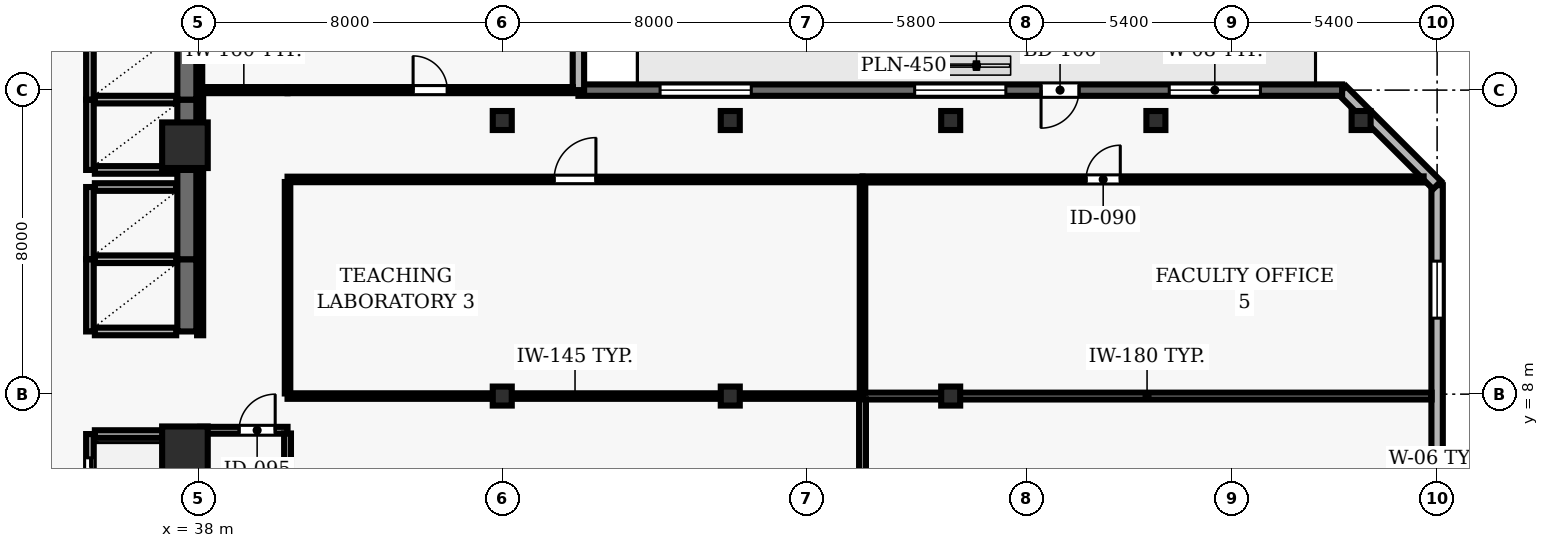
"""IFC4 building model, lengths in metres.
Left out: names, types, materials, properties, quantities, classifications, styles, units other than length and angle.
Written with IfcOpenShell. Run it as: python <this file> out.ifc"""

import sys

from ifc_helpers import new_model, si_unit, direction, frame, frame_2d, origin, origin_2d, place, context, subcontext, project, spatial, rectangle, hollow_rectangle, extrude, element, fill, save


model = new_model("IFC4")
c1 = context("Model", 3, precision=1e-05, world=origin(), true_north=direction((0.0, 1.0)))
c2 = subcontext(c1, "Body", "Model", "MODEL_VIEW")
j1 = project(units=[si_unit("LENGTHUNIT", "METRE"), si_unit("PLANEANGLEUNIT", "RADIAN")], contexts=[c1])
p1 = place(None, origin())
s1 = spatial("IfcSite", under=j1, at=p1, CompositionType="ELEMENT")
p2 = place(p1, origin())
s2 = spatial("IfcBuilding", under=s1, at=p2, CompositionType="ELEMENT")
p3 = place(p2, frame((0.0, 0.0, 115.1)))
s3 = spatial("IfcBuildingStorey", under=s2, at=p3, CompositionType="ELEMENT", Elevation=115.1)
for number, where, z_axis, x_axis in (
    (1, (37.65, 6.55, 0.0), (0.0, 0.0, 1.0), (1.0, 0.0, 0.0)),
    (2, (37.65, 14.55, 0.0), (0.0, 0.0, 1.0), (1.0, 0.0, 0.0)),
):
    element("IfcColumn", number, at=place(p3, frame(where, z_axis=z_axis, x_axis=x_axis)), inside=s3, PredefinedType="COLUMN", context=c2, shape_type="SweptSolid", body=[
        extrude(rectangle(XDim=1.2, YDim=1.2, at=origin_2d()), origin(), (0.0, 0.0, 1.0), 3.9),
    ])
for number, where, z_axis, x_axis in (
    (3, (46.0, 7.95, 0.0), (0.0, 0.0, 1.0), (1.0, 0.0, 0.0)),
    (4, (46.0, 15.2, 0.0), (0.0, 0.0, 1.0), (1.0, 0.0, 0.0)),
    (5, (52.0, 7.95, 0.0), (0.0, 0.0, 1.0), (1.0, 0.0, 0.0)),
    (6, (52.0, 15.2, 0.0), (0.0, 0.0, 1.0), (1.0, 0.0, 0.0)),
    (7, (57.8, 7.95, 0.0), (0.0, 0.0, 1.0), (1.0, 0.0, 0.0)),
    (8, (57.8, 15.2, 0.0), (0.0, 0.0, 1.0), (1.0, 0.0, 0.0)),
    (9, (63.2, 15.2, 0.0), (0.0, 0.0, 1.0), (1.0, 0.0, 0.0)),
    (10, (68.6, 15.2, 0.0), (0.0, 0.0, 1.0), (1.0, 0.0, 0.0)),
):
    element("IfcColumn", number, at=place(p3, frame(where, z_axis=z_axis, x_axis=x_axis)), inside=s3, PredefinedType="COLUMN", context=c2, shape_type="SweptSolid", body=[
        extrude(hollow_rectangle(XDim=0.5, YDim=0.5, WallThickness=0.025, at=origin_2d()), origin(), (0.0, 0.0, 1.0), 3.9),
    ])
p4 = place(p3, frame((70.6, 2.5, 0.0), z_axis=(0.0, 0.0, 1.0), x_axis=(0.0, 1.0, 0.0)))
e11 = element("IfcWall", 11, at=p4, inside=s3, PredefinedType="SOLIDWALL", context=c2, shape_type="SweptSolid", body=[
    extrude(rectangle(XDim=11.0, YDim=0.3, at=frame_2d((5.5, 0.0))), origin(), (0.0, 0.0, 1.0), 3.69),
])
p5 = place(p4, frame((2.0, 0.0, 0.9)))
e12 = element("IfcOpeningElement", 12, at=p5, cuts=e11, PredefinedType="OPENING", context=c2, shape_type="SweptSolid", body=[
    extrude(rectangle(XDim=1.5, YDim=1.8, at=frame_2d((0.75, 0.9))), frame((0.0, 0.16, 0.0), z_axis=(0.0, -1.0, 0.0), x_axis=(1.0, 0.0, 0.0)), (0.0, 0.0, 1.0), 0.32),
])
p6 = place(p4, frame((7.5, 0.0, 0.9)))
e13 = element("IfcOpeningElement", 13, at=p6, cuts=e11, PredefinedType="OPENING", context=c2, shape_type="SweptSolid", body=[
    extrude(rectangle(XDim=1.5, YDim=1.8, at=frame_2d((0.75, 0.9))), frame((0.0, 0.16, 0.0), z_axis=(0.0, -1.0, 0.0), x_axis=(1.0, 0.0, 0.0)), (0.0, 0.0, 1.0), 0.32),
])
p7 = place(p3, frame((70.6, 13.5, 0.0), z_axis=(0.0, 0.0, 1.0), x_axis=(-0.707106781187, 0.707106781187, 0.0)))
e14 = element("IfcWall", 14, at=p7, inside=s3, PredefinedType="SOLIDWALL", context=c2, shape_type="SweptSolid", body=[
    extrude(rectangle(XDim=3.536, YDim=0.3, at=frame_2d((1.768, 0.0))), origin(), (0.0, 0.0, 1.0), 3.69),
])
p8 = place(p3, frame((68.1, 16.0, 0.0), z_axis=(0.0, 0.0, 1.0), x_axis=(-1.0, 0.0, 0.0)))
e15 = element("IfcWall", 15, at=p8, inside=s3, PredefinedType="SOLIDWALL", context=c2, shape_type="SweptSolid", body=[
    extrude(rectangle(XDim=20.096, YDim=0.3, at=frame_2d((10.048, 0.0))), origin(), (0.0, 0.0, 1.0), 3.69),
])
p9 = place(p8, frame((6.922, 0.0, 0.0)))
e16 = element("IfcOpeningElement", 16, at=p9, cuts=e15, PredefinedType="OPENING", context=c2, shape_type="SweptSolid", body=[
    extrude(rectangle(XDim=1.0, YDim=2.2, at=frame_2d((0.5, 1.1))), frame((0.0, 0.16, 0.0), z_axis=(0.0, -1.0, 0.0), x_axis=(1.0, 0.0, 0.0)), (0.0, 0.0, 1.0), 0.32),
])
p10 = place(p8, frame((2.149, 0.0, 0.9)))
e17 = element("IfcOpeningElement", 17, at=p10, cuts=e15, PredefinedType="OPENING", context=c2, shape_type="SweptSolid", body=[
    extrude(rectangle(XDim=2.4, YDim=1.8, at=frame_2d((1.2, 0.9))), frame((0.0, 0.16, 0.0), z_axis=(0.0, -1.0, 0.0), x_axis=(1.0, 0.0, 0.0)), (0.0, 0.0, 1.0), 0.32),
])
p11 = place(p8, frame((8.848, 0.0, 0.9)))
e18 = element("IfcOpeningElement", 18, at=p11, cuts=e15, PredefinedType="OPENING", context=c2, shape_type="SweptSolid", body=[
    extrude(rectangle(XDim=2.4, YDim=1.8, at=frame_2d((1.2, 0.9))), frame((0.0, 0.16, 0.0), z_axis=(0.0, -1.0, 0.0), x_axis=(1.0, 0.0, 0.0)), (0.0, 0.0, 1.0), 0.32),
])
p12 = place(p8, frame((15.547, 0.0, 0.9)))
e19 = element("IfcOpeningElement", 19, at=p12, cuts=e15, PredefinedType="OPENING", context=c2, shape_type="SweptSolid", body=[
    extrude(rectangle(XDim=2.4, YDim=1.8, at=frame_2d((1.2, 0.9))), frame((0.0, 0.16, 0.0), z_axis=(0.0, -1.0, 0.0), x_axis=(1.0, 0.0, 0.0)), (0.0, 0.0, 1.0), 0.32),
])
p13 = place(p3, frame((48.004, 16.0, 0.0), z_axis=(0.0, 0.0, 1.0), x_axis=(0.0, 1.0, 0.0)))
e20 = element("IfcWall", 20, at=p13, inside=s3, PredefinedType="SOLIDWALL", context=c2, shape_type="SweptSolid", body=[
    extrude(rectangle(XDim=12.15, YDim=0.3, at=frame_2d((6.075, 0.0))), origin(), (0.0, 0.0, 1.0), 3.69),
])
p14 = place(p13, frame((1.637, 0.0, 0.9)))
e21 = element("IfcOpeningElement", 21, at=p14, cuts=e20, PredefinedType="OPENING", context=c2, shape_type="SweptSolid", body=[
    extrude(rectangle(XDim=2.8, YDim=1.8, at=frame_2d((1.4, 0.9))), frame((0.0, 0.16, 0.0), z_axis=(0.0, -1.0, 0.0), x_axis=(1.0, 0.0, 0.0)), (0.0, 0.0, 1.0), 0.32),
])
p15 = place(p13, frame((7.712, 0.0, 0.9)))
e22 = element("IfcOpeningElement", 22, at=p15, cuts=e20, PredefinedType="OPENING", context=c2, shape_type="SweptSolid", body=[
    extrude(rectangle(XDim=2.8, YDim=1.8, at=frame_2d((1.4, 0.9))), frame((0.0, 0.16, 0.0), z_axis=(0.0, -1.0, 0.0), x_axis=(1.0, 0.0, 0.0)), (0.0, 0.0, 1.0), 0.32),
])
p16 = place(p3, frame((35.15, 6.95, 0.0), z_axis=(0.0, 0.0, 1.0), x_axis=(0.0, -1.0, 0.0)))
e23 = element("IfcWall", 23, at=p16, inside=s3, PredefinedType="SOLIDWALL", context=c2, shape_type="SweptSolid", body=[
    extrude(rectangle(XDim=2.25, YDim=0.2, at=frame_2d((1.125, 0.0))), origin(), (0.0, 0.0, 1.0), 3.69),
])
p17 = place(p16, frame((0.625, 0.0, 0.0)))
e24 = element("IfcOpeningElement", 24, at=p17, cuts=e23, PredefinedType="OPENING", context=c2, shape_type="SweptSolid", body=[
    extrude(rectangle(XDim=1.0, YDim=2.1, at=frame_2d((0.5, 1.05))), frame((0.0, 0.11, 0.0), z_axis=(0.0, -1.0, 0.0), x_axis=(1.0, 0.0, 0.0)), (0.0, 0.0, 1.0), 0.22),
])
p18 = place(p3, frame((37.7, 4.7, 0.0), z_axis=(0.0, 0.0, 1.0), x_axis=(0.0, 1.0, 0.0)))
e25 = element("IfcWall", 25, at=p18, inside=s3, PredefinedType="SHEAR", context=c2, shape_type="SweptSolid", body=[
    extrude(rectangle(XDim=2.25, YDim=0.5, at=frame_2d((1.125, 0.0))), origin(), (0.0, 0.0, 1.0), 3.69),
])
p19 = place(p3, frame((37.42, 6.95, 0.0), z_axis=(0.0, 0.0, 1.0), x_axis=(-1.0, 0.0, 0.0)))
e26 = element("IfcWall", 26, at=p19, inside=s3, PredefinedType="SOLIDWALL", context=c2, shape_type="SweptSolid", body=[
    extrude(rectangle(XDim=2.14, YDim=0.2, at=frame_2d((1.07, 0.0))), origin(), (0.0, 0.0, 1.0), 3.69),
])
p20 = place(p3, frame((35.15, 11.55, 0.0), z_axis=(0.0, 0.0, 1.0), x_axis=(0.0, -1.0, 0.0)))
e27 = element("IfcWall", 27, at=p20, inside=s3, PredefinedType="SOLIDWALL", context=c2, shape_type="SweptSolid", body=[
    extrude(rectangle(XDim=1.9, YDim=0.2, at=frame_2d((0.95, 0.0))), origin(), (0.0, 0.0, 1.0), 3.69),
])
p21 = place(p3, frame((37.7, 9.65, 0.0), z_axis=(0.0, 0.0, 1.0), x_axis=(0.0, 1.0, 0.0)))
e28 = element("IfcWall", 28, at=p21, inside=s3, PredefinedType="SHEAR", context=c2, shape_type="SweptSolid", body=[
    extrude(rectangle(XDim=1.9, YDim=0.5, at=frame_2d((0.95, 0.0))), origin(), (0.0, 0.0, 1.0), 3.69),
])
for number, where, z_axis, x_axis in (
    (29, (35.28, 9.65, 0.0), (0.0, 0.0, 1.0), (1.0, 0.0, 0.0)),
    (30, (37.42, 11.55, 0.0), (0.0, 0.0, 1.0), (-1.0, 0.0, 0.0)),
):
    element("IfcWall", number, at=place(p3, frame(where, z_axis=z_axis, x_axis=x_axis)), inside=s3, PredefinedType="SOLIDWALL", context=c2, shape_type="SweptSolid", body=[
        extrude(rectangle(XDim=2.14, YDim=0.2, at=frame_2d((1.07, 0.0))), origin(), (0.0, 0.0, 1.0), 3.69),
    ])
p22 = place(p3, frame((35.15, 13.45, 0.0), z_axis=(0.0, 0.0, 1.0), x_axis=(0.0, -1.0, 0.0)))
e31 = element("IfcWall", 31, at=p22, inside=s3, PredefinedType="SOLIDWALL", context=c2, shape_type="SweptSolid", body=[
    extrude(rectangle(XDim=1.9, YDim=0.2, at=frame_2d((0.95, 0.0))), origin(), (0.0, 0.0, 1.0), 3.69),
])
p23 = place(p3, frame((37.7, 11.55, 0.0), z_axis=(0.0, 0.0, 1.0), x_axis=(0.0, 1.0, 0.0)))
e32 = element("IfcWall", 32, at=p23, inside=s3, PredefinedType="SHEAR", context=c2, shape_type="SweptSolid", body=[
    extrude(rectangle(XDim=2.35, YDim=0.5, at=frame_2d((1.175, 0.0))), origin(), (0.0, 0.0, 1.0), 3.69),
])
p24 = place(p3, frame((37.42, 13.45, 0.0), z_axis=(0.0, 0.0, 1.0), x_axis=(-1.0, 0.0, 0.0)))
e33 = element("IfcWall", 33, at=p24, inside=s3, PredefinedType="SOLIDWALL", context=c2, shape_type="SweptSolid", body=[
    extrude(rectangle(XDim=2.14, YDim=0.2, at=frame_2d((1.07, 0.0))), origin(), (0.0, 0.0, 1.0), 3.69),
])
p25 = place(p3, frame((35.15, 15.75, 0.0), z_axis=(0.0, 0.0, 1.0), x_axis=(0.0, -1.0, 0.0)))
e34 = element("IfcWall", 34, at=p25, inside=s3, PredefinedType="SOLIDWALL", context=c2, shape_type="SweptSolid", body=[
    extrude(rectangle(XDim=1.85, YDim=0.2, at=frame_2d((0.925, 0.0))), origin(), (0.0, 0.0, 1.0), 3.69),
])
p26 = place(p3, frame((37.7, 13.9, 0.0), z_axis=(0.0, 0.0, 1.0), x_axis=(0.0, 1.0, 0.0)))
e35 = element("IfcWall", 35, at=p26, inside=s3, PredefinedType="SHEAR", context=c2, shape_type="SweptSolid", body=[
    extrude(rectangle(XDim=1.85, YDim=0.5, at=frame_2d((0.925, 0.0))), origin(), (0.0, 0.0, 1.0), 3.69),
])
for number, where, z_axis, x_axis in (
    (36, (35.28, 13.9, 0.0), (0.0, 0.0, 1.0), (1.0, 0.0, 0.0)),
    (37, (37.42, 15.75, 0.0), (0.0, 0.0, 1.0), (-1.0, 0.0, 0.0)),
):
    element("IfcWall", number, at=place(p3, frame(where, z_axis=z_axis, x_axis=x_axis)), inside=s3, PredefinedType="SOLIDWALL", context=c2, shape_type="SweptSolid", body=[
        extrude(rectangle(XDim=2.14, YDim=0.2, at=frame_2d((1.07, 0.0))), origin(), (0.0, 0.0, 1.0), 3.69),
    ])
p27 = place(p3, frame((35.15, 17.6, 0.0), z_axis=(0.0, 0.0, 1.0), x_axis=(0.0, -1.0, 0.0)))
e38 = element("IfcWall", 38, at=p27, inside=s3, PredefinedType="SOLIDWALL", context=c2, shape_type="SweptSolid", body=[
    extrude(rectangle(XDim=1.85, YDim=0.2, at=frame_2d((0.925, 0.0))), origin(), (0.0, 0.0, 1.0), 3.69),
])
p28 = place(p3, frame((37.7, 15.75, 0.0), z_axis=(0.0, 0.0, 1.0), x_axis=(0.0, 1.0, 0.0)))
e39 = element("IfcWall", 39, at=p28, inside=s3, PredefinedType="SHEAR", context=c2, shape_type="SweptSolid", body=[
    extrude(rectangle(XDim=1.85, YDim=0.5, at=frame_2d((0.925, 0.0))), origin(), (0.0, 0.0, 1.0), 3.69),
])
p29 = place(p3, frame((38.05, 7.05, 0.0), z_axis=(0.0, 0.0, 1.0), x_axis=(1.0, 0.0, 0.0)))
e40 = element("IfcWall", 40, at=p29, inside=s3, PredefinedType="PARTITIONING", context=c2, shape_type="SweptSolid", body=[
    extrude(rectangle(XDim=2.3, YDim=0.18, at=frame_2d((1.15, 0.0))), origin(), (0.0, 0.0, 1.0), 3.69),
])
p30 = place(p29, frame((1.025, 0.0, 0.0)))
e41 = element("IfcOpeningElement", 41, at=p30, cuts=e40, PredefinedType="OPENING", context=c2, shape_type="SweptSolid", body=[
    extrude(rectangle(XDim=0.95, YDim=2.1, at=frame_2d((0.475, 1.05))), frame((0.0, 0.1, 0.0), z_axis=(0.0, -1.0, 0.0), x_axis=(1.0, 0.0, 0.0)), (0.0, 0.0, 1.0), 0.2),
])
p31 = place(p3, frame((40.35, 13.65, 0.0), z_axis=(0.0, 0.0, 1.0), x_axis=(1.0, 0.0, 0.0)))
e42 = element("IfcWall", 42, at=p31, inside=s3, PredefinedType="PARTITIONING", context=c2, shape_type="SweptSolid", body=[
    extrude(rectangle(XDim=15.13, YDim=0.145, at=frame_2d((7.565, 0.0))), origin(), (0.0, 0.0, 1.0), 3.69),
])
p32 = place(p31, frame((7.015, 0.0, 0.0)))
e43 = element("IfcOpeningElement", 43, at=p32, cuts=e42, PredefinedType="OPENING", context=c2, shape_type="SweptSolid", body=[
    extrude(rectangle(XDim=1.1, YDim=2.15, at=frame_2d((0.55, 1.075))), frame((0.0, 0.083, 0.0), z_axis=(0.0, -1.0, 0.0), x_axis=(1.0, 0.0, 0.0)), (0.0, 0.0, 1.0), 0.165),
])
p33 = place(p3, frame((40.35, 16.0, 0.0), z_axis=(0.0, 0.0, 1.0), x_axis=(-1.0, 0.0, 0.0)))
e44 = element("IfcWall", 44, at=p33, inside=s3, PredefinedType="PARTITIONING", context=c2, shape_type="SweptSolid", body=[
    extrude(rectangle(XDim=2.3, YDim=0.16, at=frame_2d((1.15, 0.0))), origin(), (0.0, 0.0, 1.0), 3.69),
])
p34 = place(p3, frame((40.35, 16.0, 0.0), z_axis=(0.0, 0.0, 1.0), x_axis=(1.0, 0.0, 0.0)))
e45 = element("IfcWall", 45, at=p34, inside=s3, PredefinedType="PARTITIONING", context=c2, shape_type="SweptSolid", body=[
    extrude(rectangle(XDim=7.509, YDim=0.16, at=frame_2d((3.754, 0.0))), origin(), (0.0, 0.0, 1.0), 3.39),
])
p35 = place(p34, frame((3.304, 0.0, 0.0)))
e46 = element("IfcOpeningElement", 46, at=p35, cuts=e45, PredefinedType="OPENING", context=c2, shape_type="SweptSolid", body=[
    extrude(rectangle(XDim=0.9, YDim=2.1, at=frame_2d((0.45, 1.05))), frame((0.0, 0.09, 0.0), z_axis=(0.0, -1.0, 0.0), x_axis=(1.0, 0.0, 0.0)), (0.0, 0.0, 1.0), 0.18),
])
p36 = place(p3, frame((55.48, 7.95, 0.0), z_axis=(0.0, 0.0, 1.0), x_axis=(-1.0, 0.0, 0.0)))
e47 = element("IfcWall", 47, at=p36, inside=s3, PredefinedType="PARTITIONING", context=c2, shape_type="SweptSolid", body=[
    extrude(rectangle(XDim=15.13, YDim=0.145, at=frame_2d((7.565, 0.0))), origin(), (0.0, 0.0, 1.0), 3.073),
])
p37 = place(p3, frame((55.48, 13.65, 0.0), z_axis=(0.0, 0.0, 1.0), x_axis=(1.0, 0.0, 0.0)))
e48 = element("IfcWall", 48, at=p37, inside=s3, PredefinedType="PARTITIONING", context=c2, shape_type="SweptSolid", body=[
    extrude(rectangle(XDim=14.765, YDim=0.16, at=frame_2d((7.383, 0.0))), origin(), (0.0, 0.0, 1.0), 3.69),
])
p38 = place(p37, frame((5.883, 0.0, 0.0)))
e49 = element("IfcOpeningElement", 49, at=p38, cuts=e48, PredefinedType="OPENING", context=c2, shape_type="SweptSolid", body=[
    extrude(rectangle(XDim=0.9, YDim=2.1, at=frame_2d((0.45, 1.05))), frame((0.0, 0.09, 0.0), z_axis=(0.0, -1.0, 0.0), x_axis=(1.0, 0.0, 0.0)), (0.0, 0.0, 1.0), 0.18),
])
p39 = place(p3, frame((70.455, 7.95, 0.0), z_axis=(0.0, 0.0, 1.0), x_axis=(-1.0, 0.0, 0.0)))
e50 = element("IfcWall", 50, at=p39, inside=s3, PredefinedType="PARTITIONING", context=c2, shape_type="SweptSolid", body=[
    extrude(rectangle(XDim=14.975, YDim=0.18, at=frame_2d((7.488, 0.0))), origin(), (0.0, 0.0, 1.0), 3.073),
])
p40 = place(p3, frame((38.05, 6.965, 0.0), z_axis=(0.0, 0.0, 1.0), x_axis=(0.0, -1.0, 0.0)))
e51 = element("IfcWall", 51, at=p40, inside=s3, PredefinedType="PARTITIONING", context=c2, shape_type="SweptSolid", body=[
    extrude(rectangle(XDim=6.82, YDim=0.18, at=frame_2d((3.41, 0.0))), origin(), (0.0, 0.0, 1.0), 3.073),
])
p41 = place(p3, frame((38.05, 15.925, 0.0), z_axis=(0.0, 0.0, 1.0), x_axis=(0.0, -1.0, 0.0)))
e52 = element("IfcWall", 52, at=p41, inside=s3, PredefinedType="PARTITIONING", context=c2, shape_type="SweptSolid", body=[
    extrude(rectangle(XDim=6.375, YDim=0.16, at=frame_2d((3.188, 0.0))), origin(), (0.0, 0.0, 1.0), 3.073),
])
p42 = place(p3, frame((38.05, 23.85, 0.0), z_axis=(0.0, 0.0, 1.0), x_axis=(0.0, -1.0, 0.0)))
e53 = element("IfcWall", 53, at=p42, inside=s3, PredefinedType="MOVABLE", context=c2, shape_type="SweptSolid", body=[
    extrude(rectangle(XDim=7.775, YDim=0.11, at=frame_2d((3.888, 0.0))), origin(), (0.0, 0.0, 1.0), 3.073),
])
p43 = place(p3, frame((40.35, 0.145, 0.0), z_axis=(0.0, 0.0, 1.0), x_axis=(0.0, 1.0, 0.0)))
e54 = element("IfcWall", 54, at=p43, inside=s3, PredefinedType="PARTITIONING", context=c2, shape_type="SweptSolid", body=[
    extrude(rectangle(XDim=6.82, YDim=0.18, at=frame_2d((3.41, 0.0))), origin(), (0.0, 0.0, 1.0), 3.69),
])
p44 = place(p43, frame((2.86, 0.0, 0.0)))
e55 = element("IfcOpeningElement", 55, at=p44, cuts=e54, PredefinedType="OPENING", context=c2, shape_type="SweptSolid", body=[
    extrude(rectangle(XDim=1.1, YDim=2.15, at=frame_2d((0.55, 1.075))), frame((0.0, 0.1, 0.0), z_axis=(0.0, -1.0, 0.0), x_axis=(1.0, 0.0, 0.0)), (0.0, 0.0, 1.0), 0.2),
])
p45 = place(p3, frame((40.35, 8.018, 0.0), z_axis=(0.0, 0.0, 1.0), x_axis=(0.0, 1.0, 0.0)))
e56 = element("IfcWall", 56, at=p45, inside=s3, PredefinedType="PARTITIONING", context=c2, shape_type="SweptSolid", body=[
    extrude(rectangle(XDim=5.564, YDim=0.145, at=frame_2d((2.782, 0.0))), origin(), (0.0, 0.0, 1.0), 3.69),
])
p46 = place(p3, frame((55.48, 0.145, 0.0), z_axis=(0.0, 0.0, 1.0), x_axis=(0.0, 1.0, 0.0)))
e57 = element("IfcWall", 57, at=p46, inside=s3, PredefinedType="PARTITIONING", context=c2, shape_type="SweptSolid", body=[
    extrude(rectangle(XDim=7.72, YDim=0.18, at=frame_2d((3.86, 0.0))), origin(), (0.0, 0.0, 1.0), 3.69),
])
p47 = place(p46, frame((3.385, 0.0, 0.0)))
e58 = element("IfcOpeningElement", 58, at=p47, cuts=e57, PredefinedType="OPENING", context=c2, shape_type="SweptSolid", body=[
    extrude(rectangle(XDim=0.95, YDim=2.1, at=frame_2d((0.475, 1.05))), frame((0.0, 0.1, 0.0), z_axis=(0.0, -1.0, 0.0), x_axis=(1.0, 0.0, 0.0)), (0.0, 0.0, 1.0), 0.2),
])
p48 = place(p3, frame((55.48, 8.035, 0.0), z_axis=(0.0, 0.0, 1.0), x_axis=(0.0, 1.0, 0.0)))
e59 = element("IfcWall", 59, at=p48, inside=s3, PredefinedType="PARTITIONING", context=c2, shape_type="SweptSolid", body=[
    extrude(rectangle(XDim=5.54, YDim=0.145, at=frame_2d((2.77, 0.0))), origin(), (0.0, 0.0, 1.0), 3.69),
])
p49 = place(p6, origin())
e60 = element("IfcWindow", 60, at=p49, inside=s3, PartitioningType="SINGLE_PANEL", PredefinedType="WINDOW", context=c2, shape_type="SweptSolid", body=[
    extrude(rectangle(XDim=1.5, YDim=1.8, at=frame_2d((0.75, 0.9))), frame((0.0, 0.03, 0.0), z_axis=(0.0, -1.0, 0.0), x_axis=(1.0, 0.0, 0.0)), (0.0, 0.0, 1.0), 0.06),
])
fill(e13, e60)
p50 = place(p9, origin())
e61 = element("IfcDoor", 61, at=p50, inside=s3, OperationType="SINGLE_SWING_RIGHT", PredefinedType="DOOR", context=c2, shape_type="SweptSolid", body=[
    extrude(rectangle(XDim=1.0, YDim=2.2, at=frame_2d((0.5, 1.1))), frame((0.0, 0.025, 0.0), z_axis=(0.0, -1.0, 0.0), x_axis=(1.0, 0.0, 0.0)), (0.0, 0.0, 1.0), 0.05),
])
fill(e16, e61)
p51 = place(p10, origin())
e62 = element("IfcWindow", 62, at=p51, inside=s3, PartitioningType="SINGLE_PANEL", PredefinedType="WINDOW", context=c2, shape_type="SweptSolid", body=[
    extrude(rectangle(XDim=2.4, YDim=1.8, at=frame_2d((1.2, 0.9))), frame((0.0, 0.03, 0.0), z_axis=(0.0, -1.0, 0.0), x_axis=(1.0, 0.0, 0.0)), (0.0, 0.0, 1.0), 0.06),
])
fill(e17, e62)
p52 = place(p11, origin())
e63 = element("IfcWindow", 63, at=p52, inside=s3, PartitioningType="SINGLE_PANEL", PredefinedType="WINDOW", context=c2, shape_type="SweptSolid", body=[
    extrude(rectangle(XDim=2.4, YDim=1.8, at=frame_2d((1.2, 0.9))), frame((0.0, 0.03, 0.0), z_axis=(0.0, -1.0, 0.0), x_axis=(1.0, 0.0, 0.0)), (0.0, 0.0, 1.0), 0.06),
])
fill(e18, e63)
p53 = place(p12, origin())
e64 = element("IfcWindow", 64, at=p53, inside=s3, PartitioningType="SINGLE_PANEL", PredefinedType="WINDOW", context=c2, shape_type="SweptSolid", body=[
    extrude(rectangle(XDim=2.4, YDim=1.8, at=frame_2d((1.2, 0.9))), frame((0.0, 0.03, 0.0), z_axis=(0.0, -1.0, 0.0), x_axis=(1.0, 0.0, 0.0)), (0.0, 0.0, 1.0), 0.06),
])
fill(e19, e64)
p54 = place(p17, origin())
e65 = element("IfcDoor", 65, at=p54, inside=s3, OperationType="DOUBLE_DOOR_SLIDING", PredefinedType="DOOR", context=c2, shape_type="SweptSolid", body=[
    extrude(rectangle(XDim=1.0, YDim=2.1, at=frame_2d((0.5, 1.05))), frame((0.0, 0.025, 0.0), z_axis=(0.0, -1.0, 0.0), x_axis=(1.0, 0.0, 0.0)), (0.0, 0.0, 1.0), 0.05),
])
fill(e24, e65)
p55 = place(p30, origin())
e66 = element("IfcDoor", 66, at=p55, inside=s3, OperationType="SINGLE_SWING_RIGHT", PredefinedType="DOOR", context=c2, shape_type="SweptSolid", body=[
    extrude(rectangle(XDim=0.95, YDim=2.1, at=frame_2d((0.475, 1.05))), frame((0.0, 0.025, 0.0), z_axis=(0.0, -1.0, 0.0), x_axis=(1.0, 0.0, 0.0)), (0.0, 0.0, 1.0), 0.05),
])
fill(e41, e66)
p56 = place(p32, origin())
e67 = element("IfcDoor", 67, at=p56, inside=s3, OperationType="SINGLE_SWING_RIGHT", PredefinedType="DOOR", context=c2, shape_type="SweptSolid", body=[
    extrude(rectangle(XDim=1.1, YDim=2.15, at=frame_2d((0.55, 1.075))), frame((0.0, 0.025, 0.0), z_axis=(0.0, -1.0, 0.0), x_axis=(1.0, 0.0, 0.0)), (0.0, 0.0, 1.0), 0.05),
])
fill(e43, e67)
p57 = place(p38, origin())
e68 = element("IfcDoor", 68, at=p57, inside=s3, OperationType="SINGLE_SWING_RIGHT", PredefinedType="DOOR", context=c2, shape_type="SweptSolid", body=[
    extrude(rectangle(XDim=0.9, YDim=2.1, at=frame_2d((0.45, 1.05))), frame((0.0, 0.025, 0.0), z_axis=(0.0, -1.0, 0.0), x_axis=(1.0, 0.0, 0.0)), (0.0, 0.0, 1.0), 0.05),
])
fill(e49, e68)
p58 = place(p35, origin())
e69 = element("IfcDoor", 69, at=p58, inside=s3, OperationType="SINGLE_SWING_LEFT", PredefinedType="DOOR", context=c2, shape_type="SweptSolid", body=[
    extrude(rectangle(XDim=0.9, YDim=2.1, at=frame_2d((0.45, 1.05))), frame((0.0, 0.025, 0.0), z_axis=(0.0, -1.0, 0.0), x_axis=(1.0, 0.0, 0.0)), (0.0, 0.0, 1.0), 0.05),
])
fill(e46, e69)
save(model, sys.argv[1])
